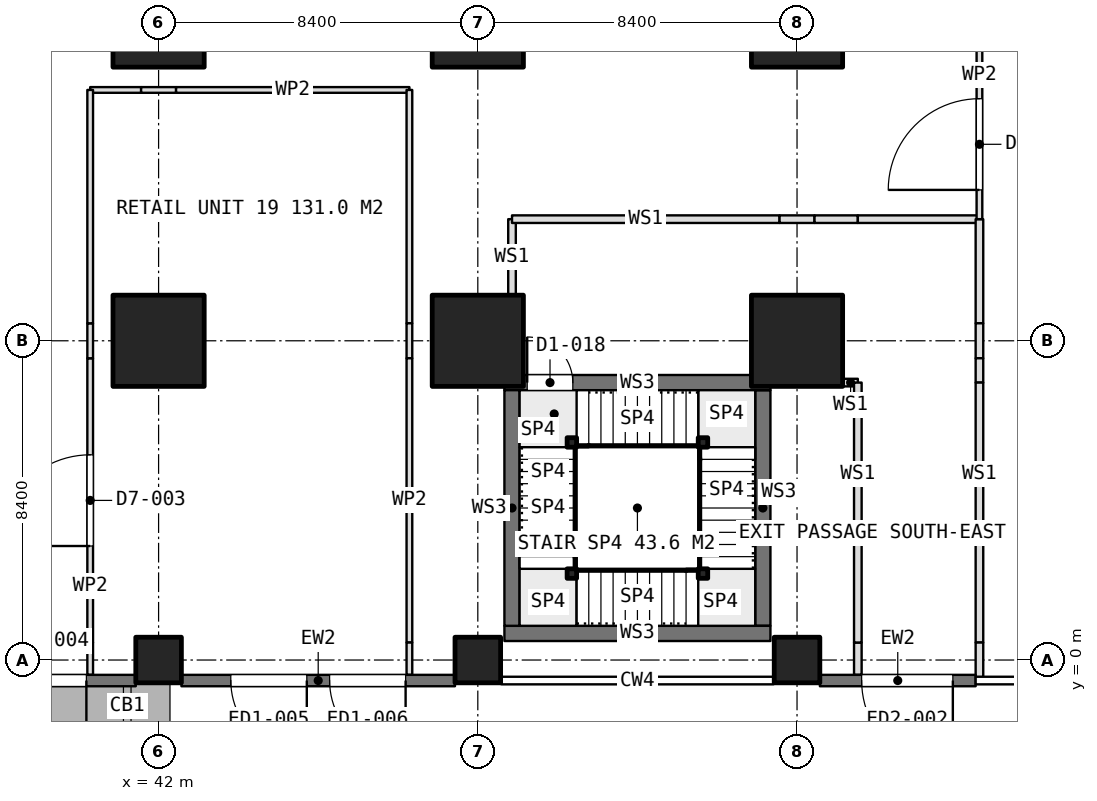
"""IFC4 building model, lengths in metres.
Left out: names, types, materials, properties, quantities, classifications, styles, units other than length and angle.
Written with IfcOpenShell. Run it as: python <this file> out.ifc"""

import sys

from ifc_helpers import new_model, si_unit, direction, frame, frame_2d, origin, origin_2d, place, context, subcontext, project, spatial, rectangle, extrude, element, fill, save


model = new_model("IFC4")
c1 = context("Model", 3, precision=1e-05, world=origin(), true_north=direction((0.0, 1.0)))
c2 = subcontext(c1, "Body", "Model", "MODEL_VIEW")
j1 = project(units=[si_unit("LENGTHUNIT", "METRE"), si_unit("PLANEANGLEUNIT", "RADIAN")], contexts=[c1])
p1 = place(None, origin())
s1 = spatial("IfcSite", under=j1, at=p1, CompositionType="ELEMENT")
p2 = place(p1, origin())
s2 = spatial("IfcBuilding", under=s1, at=p2, CompositionType="ELEMENT")
p3 = place(p2, origin())
s3 = spatial("IfcBuildingStorey", under=s2, at=p3, CompositionType="ELEMENT", Elevation=0.0)
p4 = place(p3, frame((42.0, 0.0, 0.0), z_axis=(0.0, 0.0, 1.0), x_axis=(1.0, 0.0, 0.0)))
e1 = element("IfcColumn", 1, at=p4, inside=s3, PredefinedType="COLUMN", context=c2, shape_type="SweptSolid", body=[
    extrude(rectangle(XDim=1.2, YDim=1.2, at=origin_2d()), origin(), (0.0, 0.0, 1.0), 5.4),
])
for number, where, z_axis, x_axis in (
    (2, (42.0, 8.4, 0.0), (0.0, 0.0, 1.0), (1.0, 0.0, 0.0)),
    (3, (42.0, 16.8, 0.0), (0.0, 0.0, 1.0), (1.0, 0.0, 0.0)),
):
    element("IfcColumn", number, at=place(p3, frame(where, z_axis=z_axis, x_axis=x_axis)), inside=s3, PredefinedType="COLUMN", context=c2, shape_type="SweptSolid", body=[
        extrude(rectangle(XDim=2.4, YDim=2.4, at=origin_2d()), origin(), (0.0, 0.0, 1.0), 5.4),
    ])
p5 = place(p3, frame((50.4, 0.0, 0.0), z_axis=(0.0, 0.0, 1.0), x_axis=(1.0, 0.0, 0.0)))
e4 = element("IfcColumn", 4, at=p5, inside=s3, PredefinedType="COLUMN", context=c2, shape_type="SweptSolid", body=[
    extrude(rectangle(XDim=1.2, YDim=1.2, at=origin_2d()), origin(), (0.0, 0.0, 1.0), 5.4),
])
for number, where, z_axis, x_axis in (
    (5, (50.4, 8.4, 0.0), (0.0, 0.0, 1.0), (1.0, 0.0, 0.0)),
    (6, (50.4, 16.8, 0.0), (0.0, 0.0, 1.0), (1.0, 0.0, 0.0)),
):
    element("IfcColumn", number, at=place(p3, frame(where, z_axis=z_axis, x_axis=x_axis)), inside=s3, PredefinedType="COLUMN", context=c2, shape_type="SweptSolid", body=[
        extrude(rectangle(XDim=2.4, YDim=2.4, at=origin_2d()), origin(), (0.0, 0.0, 1.0), 5.4),
    ])
p6 = place(p3, frame((58.8, 0.0, 0.0), z_axis=(0.0, 0.0, 1.0), x_axis=(1.0, 0.0, 0.0)))
e7 = element("IfcColumn", 7, at=p6, inside=s3, PredefinedType="COLUMN", context=c2, shape_type="SweptSolid", body=[
    extrude(rectangle(XDim=1.2, YDim=1.2, at=origin_2d()), origin(), (0.0, 0.0, 1.0), 5.4),
])
for number, where, z_axis, x_axis in (
    (8, (58.8, 8.4, 0.0), (0.0, 0.0, 1.0), (1.0, 0.0, 0.0)),
    (9, (58.8, 16.8, 0.0), (0.0, 0.0, 1.0), (1.0, 0.0, 0.0)),
):
    element("IfcColumn", number, at=place(p3, frame(where, z_axis=z_axis, x_axis=x_axis)), inside=s3, PredefinedType="COLUMN", context=c2, shape_type="SweptSolid", body=[
        extrude(rectangle(XDim=2.4, YDim=2.4, at=origin_2d()), origin(), (0.0, 0.0, 1.0), 5.4),
    ])
p7 = place(p3, frame((41.399, -0.54, 0.0), z_axis=(0.0, 0.0, 1.0), x_axis=(-1.0, 0.0, 0.0)))
e10 = element("IfcWall", 10, at=p7, inside=s3, PredefinedType="SOLIDWALL", context=c2, shape_type="SweptSolid", body=[
    extrude(rectangle(XDim=7.198, YDim=0.3, at=frame_2d((3.599, 0.0))), origin(), (0.0, 0.0, 1.0), 3.3),
])
p8 = place(p7, frame((3.899, 0.0, 0.0)))
e11 = element("IfcOpeningElement", 11, at=p8, cuts=e10, PredefinedType="OPENING", context=c2, shape_type="SweptSolid", body=[
    extrude(rectangle(XDim=2.0, YDim=2.7, at=frame_2d((1.0, 1.35))), frame((0.0, 0.16, 0.0), z_axis=(0.0, -1.0, 0.0), x_axis=(1.0, 0.0, 0.0)), (0.0, 0.0, 1.0), 0.32),
])
p9 = place(p7, frame((1.299, 0.0, 0.0)))
e12 = element("IfcOpeningElement", 12, at=p9, cuts=e10, PredefinedType="OPENING", context=c2, shape_type="SweptSolid", body=[
    extrude(rectangle(XDim=2.0, YDim=2.7, at=frame_2d((1.0, 1.35))), frame((0.0, 0.16, 0.0), z_axis=(0.0, -1.0, 0.0), x_axis=(1.0, 0.0, 0.0)), (0.0, 0.0, 1.0), 0.32),
])
p10 = place(p3, frame((49.799, -0.54, 0.0), z_axis=(0.0, 0.0, 1.0), x_axis=(-1.0, 0.0, 0.0)))
e13 = element("IfcWall", 13, at=p10, inside=s3, PredefinedType="SOLIDWALL", context=c2, shape_type="SweptSolid", body=[
    extrude(rectangle(XDim=7.198, YDim=0.3, at=frame_2d((3.599, 0.0))), origin(), (0.0, 0.0, 1.0), 3.3),
])
p11 = place(p10, frame((3.899, 0.0, 0.0)))
e14 = element("IfcOpeningElement", 14, at=p11, cuts=e13, PredefinedType="OPENING", context=c2, shape_type="SweptSolid", body=[
    extrude(rectangle(XDim=2.0, YDim=2.7, at=frame_2d((1.0, 1.35))), frame((0.0, 0.16, 0.0), z_axis=(0.0, -1.0, 0.0), x_axis=(1.0, 0.0, 0.0)), (0.0, 0.0, 1.0), 0.32),
])
p12 = place(p10, frame((1.299, 0.0, 0.0)))
e15 = element("IfcOpeningElement", 15, at=p12, cuts=e13, PredefinedType="OPENING", context=c2, shape_type="SweptSolid", body=[
    extrude(rectangle(XDim=2.0, YDim=2.7, at=frame_2d((1.0, 1.35))), frame((0.0, 0.16, 0.0), z_axis=(0.0, -1.0, 0.0), x_axis=(1.0, 0.0, 0.0)), (0.0, 0.0, 1.0), 0.32),
])
p13 = place(p3, frame((63.5, -0.54, 0.0), z_axis=(0.0, 0.0, 1.0), x_axis=(-1.0, 0.0, 0.0)))
e16 = element("IfcWall", 16, at=p13, inside=s3, PredefinedType="SOLIDWALL", context=c2, shape_type="SweptSolid", body=[
    extrude(rectangle(XDim=4.099, YDim=0.3, at=frame_2d((2.05, 0.0))), origin(), (0.0, 0.0, 1.0), 3.3),
])
p14 = place(p13, frame((0.6, 0.0, 0.0)))
e17 = element("IfcOpeningElement", 17, at=p14, cuts=e16, PredefinedType="OPENING", context=c2, shape_type="SweptSolid", body=[
    extrude(rectangle(XDim=2.4, YDim=2.4, at=frame_2d((1.2, 1.2))), frame((0.0, 0.16, 0.0), z_axis=(0.0, -1.0, 0.0), x_axis=(1.0, 0.0, 0.0)), (0.0, 0.0, 1.0), 0.32),
])
p15 = place(p3, frame((51.1, 0.7, 0.0), z_axis=(0.0, 0.0, 1.0), x_axis=(1.0, 0.0, 0.0)))
e18 = element("IfcWall", 18, at=p15, inside=s3, PredefinedType="SOLIDWALL", context=c2, shape_type="SweptSolid", body=[
    extrude(rectangle(XDim=7.0, YDim=0.4, at=frame_2d((3.5, 0.0))), origin(), (0.0, 0.0, 1.0), 5.1),
])
p16 = place(p3, frame((51.1, 7.3, 0.0), z_axis=(0.0, 0.0, 1.0), x_axis=(1.0, 0.0, 0.0)))
e19 = element("IfcWall", 19, at=p16, inside=s3, PredefinedType="SOLIDWALL", context=c2, shape_type="SweptSolid", body=[
    extrude(rectangle(XDim=7.0, YDim=0.4, at=frame_2d((3.5, 0.0))), origin(), (0.0, 0.0, 1.0), 5.1),
])
p17 = place(p16, frame((0.6, 0.0, 0.0)))
e20 = element("IfcOpeningElement", 20, at=p17, cuts=e19, PredefinedType="OPENING", context=c2, shape_type="SweptSolid", body=[
    extrude(rectangle(XDim=1.2, YDim=2.1, at=frame_2d((0.6, 1.05))), frame((0.0, 0.21, 0.0), z_axis=(0.0, -1.0, 0.0), x_axis=(1.0, 0.0, 0.0)), (0.0, 0.0, 1.0), 0.42),
])
for number, where, z_axis, x_axis in (
    (21, (51.3, 0.9, 0.0), (0.0, 0.0, 1.0), (0.0, 1.0, 0.0)),
    (22, (57.9, 0.9, 0.0), (0.0, 0.0, 1.0), (0.0, 1.0, 0.0)),
):
    element("IfcWall", number, at=place(p3, frame(where, z_axis=z_axis, x_axis=x_axis)), inside=s3, PredefinedType="SOLIDWALL", context=c2, shape_type="SweptSolid", body=[
        extrude(rectangle(XDim=6.2, YDim=0.4, at=frame_2d((3.1, 0.0))), origin(), (0.0, 0.0, 1.0), 5.1),
    ])
p18 = place(p3, frame((60.4, 7.3, 0.0), z_axis=(0.0, 0.0, 1.0), x_axis=(-1.0, 0.0, 0.0)))
e23 = element("IfcWall", 23, at=p18, inside=s3, PredefinedType="PARTITIONING", context=c2, shape_type="SweptSolid", body=[
    extrude(rectangle(XDim=0.38, YDim=0.2, at=frame_2d((0.19, 0.0))), origin(), (0.0, 0.0, 1.0), 5.1),
])
p19 = place(p3, frame((51.3, 9.62, 0.0), z_axis=(0.0, 0.0, 1.0), x_axis=(0.0, 1.0, 0.0)))
e24 = element("IfcWall", 24, at=p19, inside=s3, PredefinedType="PARTITIONING", context=c2, shape_type="SweptSolid", body=[
    extrude(rectangle(XDim=1.98, YDim=0.2, at=frame_2d((0.99, 0.0))), origin(), (0.0, 0.0, 1.0), 5.1),
])
p20 = place(p3, frame((51.3, 11.6, 0.0), z_axis=(0.0, 0.0, 1.0), x_axis=(1.0, 0.0, 0.0)))
e25 = element("IfcWall", 25, at=p20, inside=s3, PredefinedType="PARTITIONING", context=c2, shape_type="SweptSolid", body=[
    extrude(rectangle(XDim=7.04, YDim=0.2, at=frame_2d((3.52, 0.0))), origin(), (0.0, 0.0, 1.0), 5.1),
])
p21 = place(p3, frame((58.34, 11.6, 0.0), z_axis=(0.0, 0.0, 1.0), x_axis=(1.0, 0.0, 0.0)))
e26 = element("IfcWall", 26, at=p21, inside=s3, PredefinedType="PARTITIONING", context=c2, shape_type="SweptSolid", body=[
    extrude(rectangle(XDim=0.92, YDim=0.2, at=frame_2d((0.46, 0.0))), origin(), (0.0, 0.0, 1.0), 3.3),
])
p22 = place(p3, frame((59.26, 11.6, 0.0), z_axis=(0.0, 0.0, 1.0), x_axis=(1.0, 0.0, 0.0)))
e27 = element("IfcWall", 27, at=p22, inside=s3, PredefinedType="PARTITIONING", context=c2, shape_type="SweptSolid", body=[
    extrude(rectangle(XDim=1.14, YDim=0.2, at=frame_2d((0.57, 0.0))), origin(), (0.0, 0.0, 1.0), 5.1),
])
p23 = place(p3, frame((60.4, 11.6, 0.0), z_axis=(0.0, 0.0, 1.0), x_axis=(1.0, 0.0, 0.0)))
e28 = element("IfcWall", 28, at=p23, inside=s3, PredefinedType="PARTITIONING", context=c2, shape_type="SweptSolid", body=[
    extrude(rectangle(XDim=3.2, YDim=0.2, at=frame_2d((1.6, 0.0))), origin(), (0.0, 0.0, 1.0), 5.1),
])
p24 = place(p3, frame((63.6, 11.6, 0.0), z_axis=(0.0, 0.0, 1.0), x_axis=(0.0, -1.0, 0.0)))
e29 = element("IfcWall", 29, at=p24, inside=s3, PredefinedType="PARTITIONING", context=c2, shape_type="SweptSolid", body=[
    extrude(rectangle(XDim=2.74, YDim=0.2, at=frame_2d((1.37, 0.0))), origin(), (0.0, 0.0, 1.0), 5.1),
])
p25 = place(p3, frame((63.6, 8.86, 0.0), z_axis=(0.0, 0.0, 1.0), x_axis=(0.0, -1.0, 0.0)))
e30 = element("IfcWall", 30, at=p25, inside=s3, PredefinedType="PARTITIONING", context=c2, shape_type="SweptSolid", body=[
    extrude(rectangle(XDim=0.92, YDim=0.2, at=frame_2d((0.46, 0.0))), origin(), (0.0, 0.0, 1.0), 3.3),
])
p26 = place(p3, frame((63.6, 7.94, 0.0), z_axis=(0.0, 0.0, 1.0), x_axis=(0.0, -1.0, 0.0)))
e31 = element("IfcWall", 31, at=p26, inside=s3, PredefinedType="PARTITIONING", context=c2, shape_type="SweptSolid", body=[
    extrude(rectangle(XDim=0.64, YDim=0.2, at=frame_2d((0.32, 0.0))), origin(), (0.0, 0.0, 1.0), 5.1),
])
p27 = place(p3, frame((63.6, 7.3, 0.0), z_axis=(0.0, 0.0, 1.0), x_axis=(0.0, -1.0, 0.0)))
e32 = element("IfcWall", 32, at=p27, inside=s3, PredefinedType="PARTITIONING", context=c2, shape_type="SweptSolid", body=[
    extrude(rectangle(XDim=6.84, YDim=0.2, at=frame_2d((3.42, 0.0))), origin(), (0.0, 0.0, 1.0), 5.1),
])
p28 = place(p3, frame((63.6, 0.46, 0.0), z_axis=(0.0, 0.0, 1.0), x_axis=(0.0, -1.0, 0.0)))
e33 = element("IfcWall", 33, at=p28, inside=s3, PredefinedType="PARTITIONING", context=c2, shape_type="SweptSolid", body=[
    extrude(rectangle(XDim=0.91, YDim=0.2, at=frame_2d((0.455, 0.0))), origin(), (0.0, 0.0, 1.0), 3.3),
])
p29 = place(p3, frame((60.4, -0.39, 0.0), z_axis=(0.0, 0.0, 1.0), x_axis=(0.0, 1.0, 0.0)))
e34 = element("IfcWall", 34, at=p29, inside=s3, PredefinedType="PARTITIONING", context=c2, shape_type="SweptSolid", body=[
    extrude(rectangle(XDim=0.85, YDim=0.2, at=frame_2d((0.425, 0.0))), origin(), (0.0, 0.0, 1.0), 3.3),
])
p30 = place(p3, frame((60.4, 0.46, 0.0), z_axis=(0.0, 0.0, 1.0), x_axis=(0.0, 1.0, 0.0)))
e35 = element("IfcWall", 35, at=p30, inside=s3, PredefinedType="PARTITIONING", context=c2, shape_type="SweptSolid", body=[
    extrude(rectangle(XDim=6.84, YDim=0.2, at=frame_2d((3.42, 0.0))), origin(), (0.0, 0.0, 1.0), 5.1),
])
p31 = place(p3, frame((63.6, 11.6, 0.0), z_axis=(0.0, 0.0, 1.0), x_axis=(0.0, 1.0, 0.0)))
e36 = element("IfcWall", 36, at=p31, inside=s3, PredefinedType="PARTITIONING", context=c2, shape_type="SweptSolid", body=[
    extrude(rectangle(XDim=4.74, YDim=0.15, at=frame_2d((2.37, 0.0))), origin(), (0.0, 0.0, 1.0), 5.1),
])
p32 = place(p31, frame((0.77, 0.0, 0.0)))
e37 = element("IfcOpeningElement", 37, at=p32, cuts=e36, PredefinedType="OPENING", context=c2, shape_type="SweptSolid", body=[
    extrude(rectangle(XDim=2.4, YDim=2.4, at=frame_2d((1.2, 1.2))), frame((0.0, 0.085, 0.0), z_axis=(0.0, -1.0, 0.0), x_axis=(1.0, 0.0, 0.0)), (0.0, 0.0, 1.0), 0.17),
])
p33 = place(p3, frame((40.2, 15.0, 0.0), z_axis=(0.0, 0.0, 1.0), x_axis=(1.0, 0.0, 0.0)))
e38 = element("IfcWall", 38, at=p33, inside=s3, PredefinedType="PARTITIONING", context=c2, shape_type="SweptSolid", body=[
    extrude(rectangle(XDim=1.34, YDim=0.15, at=frame_2d((0.67, 0.0))), origin(), (0.0, 0.0, 1.0), 5.1),
])
p34 = place(p3, frame((41.54, 15.0, 0.0), z_axis=(0.0, 0.0, 1.0), x_axis=(1.0, 0.0, 0.0)))
e39 = element("IfcWall", 39, at=p34, inside=s3, PredefinedType="PARTITIONING", context=c2, shape_type="SweptSolid", body=[
    extrude(rectangle(XDim=0.92, YDim=0.15, at=frame_2d((0.46, 0.0))), origin(), (0.0, 0.0, 1.0), 3.3),
])
p35 = place(p3, frame((42.46, 15.0, 0.0), z_axis=(0.0, 0.0, 1.0), x_axis=(1.0, 0.0, 0.0)))
e40 = element("IfcWall", 40, at=p35, inside=s3, PredefinedType="PARTITIONING", context=c2, shape_type="SweptSolid", body=[
    extrude(rectangle(XDim=6.14, YDim=0.15, at=frame_2d((3.07, 0.0))), origin(), (0.0, 0.0, 1.0), 5.1),
])
p36 = place(p3, frame((48.6, 15.0, 0.0), z_axis=(0.0, 0.0, 1.0), x_axis=(0.0, -1.0, 0.0)))
e41 = element("IfcWall", 41, at=p36, inside=s3, PredefinedType="PARTITIONING", context=c2, shape_type="SweptSolid", body=[
    extrude(rectangle(XDim=6.14, YDim=0.15, at=frame_2d((3.07, 0.0))), origin(), (0.0, 0.0, 1.0), 5.1),
])
p37 = place(p3, frame((48.6, 8.86, 0.0), z_axis=(0.0, 0.0, 1.0), x_axis=(0.0, -1.0, 0.0)))
e42 = element("IfcWall", 42, at=p37, inside=s3, PredefinedType="PARTITIONING", context=c2, shape_type="SweptSolid", body=[
    extrude(rectangle(XDim=0.92, YDim=0.15, at=frame_2d((0.46, 0.0))), origin(), (0.0, 0.0, 1.0), 3.3),
])
p38 = place(p3, frame((48.6, 7.94, 0.0), z_axis=(0.0, 0.0, 1.0), x_axis=(0.0, -1.0, 0.0)))
e43 = element("IfcWall", 43, at=p38, inside=s3, PredefinedType="PARTITIONING", context=c2, shape_type="SweptSolid", body=[
    extrude(rectangle(XDim=7.48, YDim=0.15, at=frame_2d((3.74, 0.0))), origin(), (0.0, 0.0, 1.0), 5.1),
])
for number, where, z_axis, x_axis in (
    (44, (48.6, 0.46, 0.0), (0.0, 0.0, 1.0), (0.0, -1.0, 0.0)),
    (45, (40.2, -0.39, 0.0), (0.0, 0.0, 1.0), (0.0, 1.0, 0.0)),
):
    element("IfcWall", number, at=place(p3, frame(where, z_axis=z_axis, x_axis=x_axis)), inside=s3, PredefinedType="PARTITIONING", context=c2, shape_type="SweptSolid", body=[
        extrude(rectangle(XDim=0.85, YDim=0.15, at=frame_2d((0.425, 0.0))), origin(), (0.0, 0.0, 1.0), 3.3),
    ])
p39 = place(p3, frame((40.2, 0.46, 0.0), z_axis=(0.0, 0.0, 1.0), x_axis=(0.0, 1.0, 0.0)))
e46 = element("IfcWall", 46, at=p39, inside=s3, PredefinedType="PARTITIONING", context=c2, shape_type="SweptSolid", body=[
    extrude(rectangle(XDim=7.48, YDim=0.15, at=frame_2d((3.74, 0.0))), origin(), (0.0, 0.0, 1.0), 5.1),
])
p40 = place(p39, frame((2.54, 0.0, 0.0)))
e47 = element("IfcOpeningElement", 47, at=p40, cuts=e46, PredefinedType="OPENING", context=c2, shape_type="SweptSolid", body=[
    extrude(rectangle(XDim=2.4, YDim=2.4, at=frame_2d((1.2, 1.2))), frame((0.0, 0.085, 0.0), z_axis=(0.0, -1.0, 0.0), x_axis=(1.0, 0.0, 0.0)), (0.0, 0.0, 1.0), 0.17),
])
p41 = place(p3, frame((40.2, 7.94, 0.0), z_axis=(0.0, 0.0, 1.0), x_axis=(0.0, 1.0, 0.0)))
e48 = element("IfcWall", 48, at=p41, inside=s3, PredefinedType="PARTITIONING", context=c2, shape_type="SweptSolid", body=[
    extrude(rectangle(XDim=0.92, YDim=0.15, at=frame_2d((0.46, 0.0))), origin(), (0.0, 0.0, 1.0), 3.3),
])
p42 = place(p3, frame((40.2, 8.86, 0.0), z_axis=(0.0, 0.0, 1.0), x_axis=(0.0, 1.0, 0.0)))
e49 = element("IfcWall", 49, at=p42, inside=s3, PredefinedType="PARTITIONING", context=c2, shape_type="SweptSolid", body=[
    extrude(rectangle(XDim=6.14, YDim=0.15, at=frame_2d((3.07, 0.0))), origin(), (0.0, 0.0, 1.0), 5.1),
])
for number, where, z_axis, x_axis in (
    (50, (52.875, 5.725, 0.0), (0.0, 0.0, 1.0), (1.0, 0.0, 0.0)),
    (51, (52.875, 2.275, 0.0), (0.0, 0.0, 1.0), (1.0, 0.0, 0.0)),
    (52, (56.325, 2.275, 0.0), (0.0, 0.0, 1.0), (1.0, 0.0, 0.0)),
    (53, (56.325, 5.725, 0.0), (0.0, 0.0, 1.0), (1.0, 0.0, 0.0)),
):
    element("IfcColumn", number, at=place(p3, frame(where, z_axis=z_axis, x_axis=x_axis)), inside=s3, PredefinedType="COLUMN", context=c2, shape_type="SweptSolid", body=[
        extrude(rectangle(XDim=0.25, YDim=0.25, at=origin_2d()), origin(), (0.0, 0.0, 1.0), 5.4),
    ])
p43 = place(p9, origin())
e54 = element("IfcDoor", 54, at=p43, inside=s3, OperationType="DOUBLE_DOOR_SINGLE_SWING", PredefinedType="DOOR", context=c2, shape_type="SweptSolid", body=[
    extrude(rectangle(XDim=2.0, YDim=2.7, at=frame_2d((1.0, 1.35))), frame((0.0, 0.025, 0.0), z_axis=(0.0, -1.0, 0.0), x_axis=(1.0, 0.0, 0.0)), (0.0, 0.0, 1.0), 0.05),
])
fill(e12, e54)
p44 = place(p11, origin())
e55 = element("IfcDoor", 55, at=p44, inside=s3, OperationType="DOUBLE_DOOR_SINGLE_SWING", PredefinedType="DOOR", context=c2, shape_type="SweptSolid", body=[
    extrude(rectangle(XDim=2.0, YDim=2.7, at=frame_2d((1.0, 1.35))), frame((0.0, 0.025, 0.0), z_axis=(0.0, -1.0, 0.0), x_axis=(1.0, 0.0, 0.0)), (0.0, 0.0, 1.0), 0.05),
])
fill(e14, e55)
p45 = place(p12, origin())
e56 = element("IfcDoor", 56, at=p45, inside=s3, OperationType="DOUBLE_DOOR_SINGLE_SWING", PredefinedType="DOOR", context=c2, shape_type="SweptSolid", body=[
    extrude(rectangle(XDim=2.0, YDim=2.7, at=frame_2d((1.0, 1.35))), frame((0.0, 0.025, 0.0), z_axis=(0.0, -1.0, 0.0), x_axis=(1.0, 0.0, 0.0)), (0.0, 0.0, 1.0), 0.05),
])
fill(e15, e56)
p46 = place(p14, origin())
e57 = element("IfcDoor", 57, at=p46, inside=s3, OperationType="DOUBLE_DOOR_SINGLE_SWING", PredefinedType="DOOR", context=c2, shape_type="SweptSolid", body=[
    extrude(rectangle(XDim=2.4, YDim=2.4, at=frame_2d((1.2, 1.2))), frame((0.0, 0.025, 0.0), z_axis=(0.0, -1.0, 0.0), x_axis=(1.0, 0.0, 0.0)), (0.0, 0.0, 1.0), 0.05),
])
fill(e17, e57)
p47 = place(p32, origin())
e58 = element("IfcDoor", 58, at=p47, inside=s3, OperationType="DOUBLE_DOOR_SINGLE_SWING", PredefinedType="DOOR", context=c2, shape_type="SweptSolid", body=[
    extrude(rectangle(XDim=2.4, YDim=2.4, at=frame_2d((1.2, 1.2))), frame((0.0, 0.025, 0.0), z_axis=(0.0, -1.0, 0.0), x_axis=(1.0, 0.0, 0.0)), (0.0, 0.0, 1.0), 0.05),
])
fill(e37, e58)
p48 = place(p40, origin())
e59 = element("IfcDoor", 59, at=p48, inside=s3, OperationType="DOUBLE_DOOR_SINGLE_SWING", PredefinedType="DOOR", context=c2, shape_type="SweptSolid", body=[
    extrude(rectangle(XDim=2.4, YDim=2.4, at=frame_2d((1.2, 1.2))), frame((0.0, 0.025, 0.0), z_axis=(0.0, -1.0, 0.0), x_axis=(1.0, 0.0, 0.0)), (0.0, 0.0, 1.0), 0.05),
])
fill(e47, e59)
p49 = place(p17, origin())
e60 = element("IfcDoor", 60, at=p49, inside=s3, OperationType="SINGLE_SWING_RIGHT", PredefinedType="DOOR", context=c2, shape_type="SweptSolid", body=[
    extrude(rectangle(XDim=1.2, YDim=2.1, at=frame_2d((0.6, 1.05))), frame((0.0, 0.025, 0.0), z_axis=(0.0, -1.0, 0.0), x_axis=(1.0, 0.0, 0.0)), (0.0, 0.0, 1.0), 0.05),
])
fill(e20, e60)
save(model, sys.argv[1])
